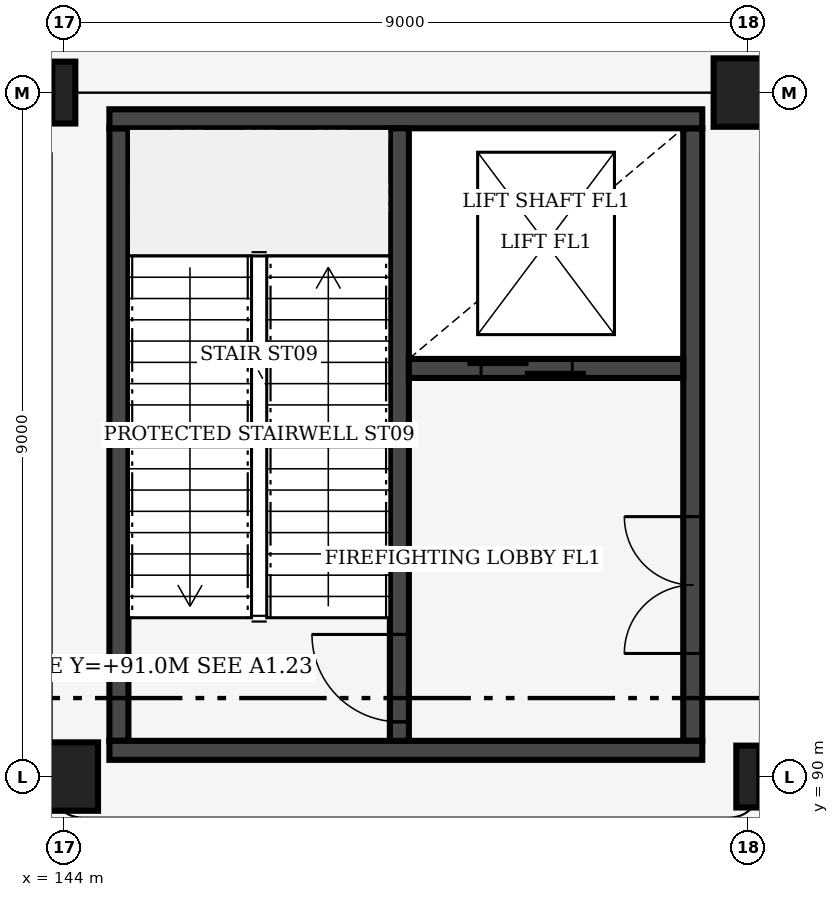
"""IFC4 building model, lengths in metres.
Left out: names, types, materials, properties, quantities, classifications, styles, units other than length and angle.
Written with IfcOpenShell. Run it as: python <this file> out.ifc"""

import sys

from ifc_helpers import new_model, si_unit, direction, frame, frame_2d, origin, origin_2d, place, context, subcontext, project, spatial, rectangle, i_section, extrude, element, fill, save


model = new_model("IFC4")
c1 = context("Model", 3, precision=1e-05, world=origin(), true_north=direction((0.0, 1.0)))
c2 = subcontext(c1, "Body", "Model", "MODEL_VIEW")
j1 = project(units=[si_unit("LENGTHUNIT", "METRE"), si_unit("PLANEANGLEUNIT", "RADIAN")], contexts=[c1])
p1 = place(None, origin())
s1 = spatial("IfcSite", under=j1, at=p1, CompositionType="ELEMENT")
p2 = place(p1, origin())
s2 = spatial("IfcBuilding", under=s1, at=p2, CompositionType="ELEMENT")
p3 = place(p2, origin())
s3 = spatial("IfcBuildingStorey", under=s2, at=p3, CompositionType="ELEMENT", Elevation=0.0)
p4 = place(p3, frame((144.0, 90.0, 0.0), z_axis=(0.0, 0.0, 1.0), x_axis=(1.0, 0.0, 0.0)))
e1 = element("IfcColumn", 1, at=p4, inside=s3, PredefinedType="COLUMN", context=c2, shape_type="SweptSolid", body=[
    extrude(rectangle(XDim=0.9, YDim=0.9, at=origin_2d()), origin(), (0.0, 0.0, 1.0), 6.0),
])
for number, where, z_axis, x_axis in (
    (2, (144.0, 99.0, 0.0), (0.0, 0.0, 1.0), (1.0, 0.0, 0.0)),
    (3, (153.0, 90.0, 0.0), (0.0, 0.0, 1.0), (1.0, 0.0, 0.0)),
):
    element("IfcColumn", number, at=place(p3, frame(where, z_axis=z_axis, x_axis=x_axis)), inside=s3, PredefinedType="COLUMN", context=c2, shape_type="SweptSolid", body=[
        extrude(i_section(OverallWidth=0.303, OverallDepth=0.814, WebThickness=0.021, FlangeThickness=0.04, FilletRadius=0.03, at=origin_2d()), origin(), (0.0, 0.0, 1.0), 6.0),
    ])
p5 = place(p3, frame((153.0, 99.0, 0.0), z_axis=(0.0, 0.0, 1.0), x_axis=(1.0, 0.0, 0.0)))
e4 = element("IfcColumn", 4, at=p5, inside=s3, PredefinedType="COLUMN", context=c2, shape_type="SweptSolid", body=[
    extrude(rectangle(XDim=0.9, YDim=0.9, at=origin_2d()), origin(), (0.0, 0.0, 1.0), 6.0),
])
p6 = place(p3, frame((144.725, 90.47, 0.0), z_axis=(0.0, 0.0, 1.0), x_axis=(0.0, 1.0, 0.0)))
e5 = element("IfcWall", 5, at=p6, inside=s3, PredefinedType="SHEAR", context=c2, shape_type="SweptSolid", body=[
    extrude(rectangle(XDim=8.06, YDim=0.25, at=frame_2d((4.03, 0.0))), origin(), (0.0, 0.0, 1.0), 5.64),
])
p7 = place(p3, frame((152.275, 90.47, 0.0), z_axis=(0.0, 0.0, 1.0), x_axis=(0.0, 1.0, 0.0)))
e6 = element("IfcWall", 6, at=p7, inside=s3, PredefinedType="SHEAR", context=c2, shape_type="SweptSolid", body=[
    extrude(rectangle(XDim=8.06, YDim=0.25, at=frame_2d((4.03, 0.0))), origin(), (0.0, 0.0, 1.0), 5.64),
])
p8 = place(p7, frame((1.15, 0.0, 0.0)))
e7 = element("IfcOpeningElement", 7, at=p8, cuts=e6, PredefinedType="OPENING", context=c2, shape_type="SweptSolid", body=[
    extrude(rectangle(XDim=1.8, YDim=2.2, at=frame_2d((0.9, 1.1))), frame((0.0, 0.135, 0.0), z_axis=(0.0, -1.0, 0.0), x_axis=(1.0, 0.0, 0.0)), (0.0, 0.0, 1.0), 0.27),
])
for number, where, z_axis, x_axis in (
    (8, (144.6, 90.345, 0.0), (0.0, 0.0, 1.0), (1.0, 0.0, 0.0)),
    (9, (144.6, 98.655, 0.0), (0.0, 0.0, 1.0), (1.0, 0.0, 0.0)),
):
    element("IfcWall", number, at=place(p3, frame(where, z_axis=z_axis, x_axis=x_axis)), inside=s3, PredefinedType="SHEAR", context=c2, shape_type="SweptSolid", body=[
        extrude(rectangle(XDim=7.8, YDim=0.25, at=frame_2d((3.9, 0.0))), origin(), (0.0, 0.0, 1.0), 5.64),
    ])
p9 = place(p3, frame((148.415, 90.47, 0.0), z_axis=(0.0, 0.0, 1.0), x_axis=(0.0, 1.0, 0.0)))
e10 = element("IfcWall", 10, at=p9, inside=s3, PredefinedType="SHEAR", context=c2, shape_type="SweptSolid", body=[
    extrude(rectangle(XDim=8.06, YDim=0.25, at=frame_2d((4.03, 0.0))), origin(), (0.0, 0.0, 1.0), 5.64),
])
p10 = place(p9, frame((0.25, 0.0, 0.0)))
e11 = element("IfcOpeningElement", 11, at=p10, cuts=e10, PredefinedType="OPENING", context=c2, shape_type="SweptSolid", body=[
    extrude(rectangle(XDim=1.15, YDim=2.15, at=frame_2d((0.575, 1.075))), frame((0.0, 0.135, 0.0), z_axis=(0.0, -1.0, 0.0), x_axis=(1.0, 0.0, 0.0)), (0.0, 0.0, 1.0), 0.27),
])
p11 = place(p3, frame((148.54, 95.37, 0.0), z_axis=(0.0, 0.0, 1.0), x_axis=(1.0, 0.0, 0.0)))
e12 = element("IfcWall", 12, at=p11, inside=s3, PredefinedType="SHEAR", context=c2, shape_type="SweptSolid", body=[
    extrude(rectangle(XDim=3.61, YDim=0.25, at=frame_2d((1.805, 0.0))), origin(), (0.0, 0.0, 1.0), 5.64),
])
p12 = place(p11, frame((0.95, 0.0, 0.0)))
e13 = element("IfcOpeningElement", 13, at=p12, cuts=e12, PredefinedType="OPENING", context=c2, shape_type="SweptSolid", body=[
    extrude(rectangle(XDim=1.2, YDim=2.2, at=frame_2d((0.6, 1.1))), frame((0.0, 0.135, 0.0), z_axis=(0.0, -1.0, 0.0), x_axis=(1.0, 0.0, 0.0)), (0.0, 0.0, 1.0), 0.27),
])
p13 = place(p10, origin())
e14 = element("IfcDoor", 14, at=p13, inside=s3, OperationType="SINGLE_SWING_RIGHT", PredefinedType="DOOR", context=c2, shape_type="SweptSolid", body=[
    extrude(rectangle(XDim=1.15, YDim=2.15, at=frame_2d((0.575, 1.075))), frame((0.0, 0.025, 0.0), z_axis=(0.0, -1.0, 0.0), x_axis=(1.0, 0.0, 0.0)), (0.0, 0.0, 1.0), 0.05),
])
fill(e11, e14)
p14 = place(p12, origin())
e15 = element("IfcDoor", 15, at=p14, inside=s3, OperationType="DOUBLE_DOOR_SLIDING", PredefinedType="DOOR", context=c2, shape_type="SweptSolid", body=[
    extrude(rectangle(XDim=1.2, YDim=2.2, at=frame_2d((0.6, 1.1))), frame((0.0, 0.025, 0.0), z_axis=(0.0, -1.0, 0.0), x_axis=(1.0, 0.0, 0.0)), (0.0, 0.0, 1.0), 0.05),
])
fill(e13, e15)
p15 = place(p8, origin())
e16 = element("IfcDoor", 16, at=p15, inside=s3, OperationType="DOUBLE_DOOR_SINGLE_SWING", PredefinedType="DOOR", context=c2, shape_type="SweptSolid", body=[
    extrude(rectangle(XDim=1.8, YDim=2.2, at=frame_2d((0.9, 1.1))), frame((0.0, 0.025, 0.0), z_axis=(0.0, -1.0, 0.0), x_axis=(1.0, 0.0, 0.0)), (0.0, 0.0, 1.0), 0.05),
])
fill(e7, e16)
save(model, sys.argv[1])
